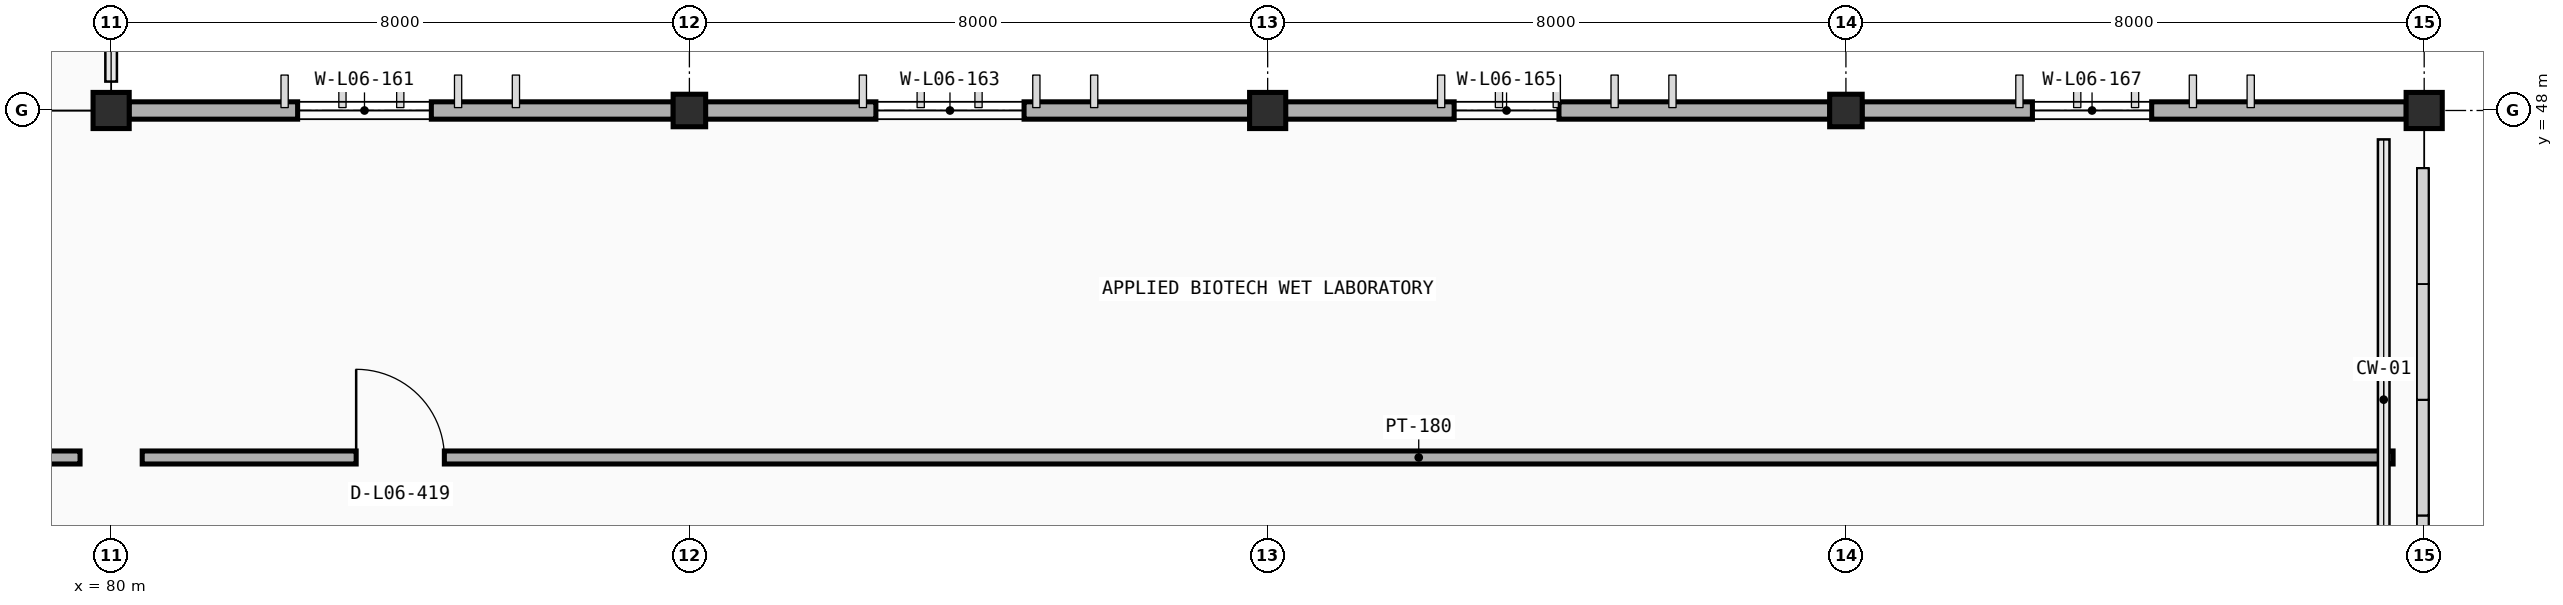
"""IFC4 building model, lengths in metres.
Left out: names, types, materials, properties, quantities, classifications, styles, units other than length and angle.
Written with IfcOpenShell. Run it as: python <this file> out.ifc"""

import sys

from ifc_helpers import new_model, si_unit, direction, frame, frame_2d, origin, origin_2d, place, context, subcontext, project, spatial, rectangle, extrude, element, fill, save


model = new_model("IFC4")
c1 = context("Model", 3, precision=1e-05, world=origin(), true_north=direction((0.0, 1.0)))
c2 = subcontext(c1, "Body", "Model", "MODEL_VIEW")
j1 = project(units=[si_unit("LENGTHUNIT", "METRE"), si_unit("PLANEANGLEUNIT", "RADIAN")], contexts=[c1])
p1 = place(None, origin())
s1 = spatial("IfcSite", under=j1, at=p1, CompositionType="ELEMENT")
p2 = place(p1, origin())
s2 = spatial("IfcBuilding", under=s1, at=p2, CompositionType="ELEMENT")
p3 = place(p2, frame((0.0, 0.0, 22.2)))
s3 = spatial("IfcBuildingStorey", under=s2, at=p3, CompositionType="ELEMENT", Elevation=22.2)
p4 = place(p3, frame((80.0, 48.0, 0.0), z_axis=(0.0, 0.0, 1.0), x_axis=(1.0, 0.0, 0.0)))
e1 = element("IfcColumn", 1, at=p4, inside=s3, PredefinedType="COLUMN", context=c2, shape_type="SweptSolid", body=[
    extrude(rectangle(XDim=0.5, YDim=0.5, at=origin_2d()), origin(), (0.0, 0.0, 1.0), 4.2),
])
p5 = place(p3, frame((88.0, 48.0, 0.0), z_axis=(0.0, 0.0, 1.0), x_axis=(1.0, 0.0, 0.0)))
e2 = element("IfcColumn", 2, at=p5, inside=s3, PredefinedType="COLUMN", context=c2, shape_type="SweptSolid", body=[
    extrude(rectangle(XDim=0.45, YDim=0.45, at=origin_2d()), origin(), (0.0, 0.0, 1.0), 4.2),
])
p6 = place(p3, frame((96.0, 48.0, 0.0), z_axis=(0.0, 0.0, 1.0), x_axis=(1.0, 0.0, 0.0)))
e3 = element("IfcColumn", 3, at=p6, inside=s3, PredefinedType="COLUMN", context=c2, shape_type="SweptSolid", body=[
    extrude(rectangle(XDim=0.5, YDim=0.5, at=origin_2d()), origin(), (0.0, 0.0, 1.0), 4.2),
])
p7 = place(p3, frame((104.0, 48.0, 0.0), z_axis=(0.0, 0.0, 1.0), x_axis=(1.0, 0.0, 0.0)))
e4 = element("IfcColumn", 4, at=p7, inside=s3, PredefinedType="COLUMN", context=c2, shape_type="SweptSolid", body=[
    extrude(rectangle(XDim=0.45, YDim=0.45, at=origin_2d()), origin(), (0.0, 0.0, 1.0), 4.2),
])
p8 = place(p3, frame((112.0, 48.0, 0.0), z_axis=(0.0, 0.0, 1.0), x_axis=(1.0, 0.0, 0.0)))
e5 = element("IfcColumn", 5, at=p8, inside=s3, PredefinedType="COLUMN", context=c2, shape_type="SweptSolid", body=[
    extrude(rectangle(XDim=0.5, YDim=0.5, at=origin_2d()), origin(), (0.0, 0.0, 1.0), 4.2),
])
p9 = place(p3, frame((80.247, 48.0, 0.0), z_axis=(0.0, 0.0, 1.0), x_axis=(1.0, 0.0, 0.0)))
e6 = element("IfcWall", 6, at=p9, inside=s3, PredefinedType="STANDARD", context=c2, shape_type="SweptSolid", body=[
    extrude(rectangle(XDim=7.531, YDim=0.24, at=frame_2d((3.766, 0.0))), origin(), (0.0, 0.0, 1.0), 3.335),
])
p10 = place(p9, frame((2.333, 0.0, 0.9)))
e7 = element("IfcOpeningElement", 7, at=p10, cuts=e6, PredefinedType="OPENING", context=c2, shape_type="SweptSolid", body=[
    extrude(rectangle(XDim=1.85, YDim=1.7, at=frame_2d((0.925, 0.85))), frame((0.0, 0.13, 0.0), z_axis=(0.0, -1.0, 0.0), x_axis=(1.0, 0.0, 0.0)), (0.0, 0.0, 1.0), 0.26),
])
p11 = place(p3, frame((88.222, 48.0, 0.0), z_axis=(0.0, 0.0, 1.0), x_axis=(1.0, 0.0, 0.0)))
e8 = element("IfcWall", 8, at=p11, inside=s3, PredefinedType="STANDARD", context=c2, shape_type="SweptSolid", body=[
    extrude(rectangle(XDim=7.531, YDim=0.24, at=frame_2d((3.766, 0.0))), origin(), (0.0, 0.0, 1.0), 3.335),
])
p12 = place(p11, frame((2.358, 0.0, 0.9)))
e9 = element("IfcOpeningElement", 9, at=p12, cuts=e8, PredefinedType="OPENING", context=c2, shape_type="SweptSolid", body=[
    extrude(rectangle(XDim=2.05, YDim=1.7, at=frame_2d((1.025, 0.85))), frame((0.0, 0.13, 0.0), z_axis=(0.0, -1.0, 0.0), x_axis=(1.0, 0.0, 0.0)), (0.0, 0.0, 1.0), 0.26),
])
p13 = place(p3, frame((96.247, 48.0, 0.0), z_axis=(0.0, 0.0, 1.0), x_axis=(1.0, 0.0, 0.0)))
e10 = element("IfcWall", 10, at=p13, inside=s3, PredefinedType="STANDARD", context=c2, shape_type="SweptSolid", body=[
    extrude(rectangle(XDim=7.531, YDim=0.24, at=frame_2d((3.766, 0.0))), origin(), (0.0, 0.0, 1.0), 3.335),
])
p14 = place(p13, frame((2.333, 0.0, 0.9)))
e11 = element("IfcOpeningElement", 11, at=p14, cuts=e10, PredefinedType="OPENING", context=c2, shape_type="SweptSolid", body=[
    extrude(rectangle(XDim=1.45, YDim=1.7, at=frame_2d((0.725, 0.85))), frame((0.0, 0.13, 0.0), z_axis=(0.0, -1.0, 0.0), x_axis=(1.0, 0.0, 0.0)), (0.0, 0.0, 1.0), 0.26),
])
p15 = place(p3, frame((104.222, 48.0, 0.0), z_axis=(0.0, 0.0, 1.0), x_axis=(1.0, 0.0, 0.0)))
e12 = element("IfcWall", 12, at=p15, inside=s3, PredefinedType="STANDARD", context=c2, shape_type="SweptSolid", body=[
    extrude(rectangle(XDim=7.531, YDim=0.24, at=frame_2d((3.766, 0.0))), origin(), (0.0, 0.0, 1.0), 3.335),
])
p16 = place(p15, frame((2.358, 0.0, 0.9)))
e13 = element("IfcOpeningElement", 13, at=p16, cuts=e12, PredefinedType="OPENING", context=c2, shape_type="SweptSolid", body=[
    extrude(rectangle(XDim=1.65, YDim=1.7, at=frame_2d((0.825, 0.85))), frame((0.0, 0.13, 0.0), z_axis=(0.0, -1.0, 0.0), x_axis=(1.0, 0.0, 0.0)), (0.0, 0.0, 1.0), 0.26),
])
p17 = place(p3, frame((111.76, 47.78, 0.0), z_axis=(0.0, 0.0, 1.0), x_axis=(-1.0, 0.0, 0.0)))
e14 = element("IfcWall", 14, at=p17, inside=s3, PredefinedType="PARAPET", context=c2, shape_type="SweptSolid", body=[
    extrude(rectangle(XDim=0.32, YDim=0.2, at=frame_2d((0.16, 0.0))), origin(), (0.0, 0.0, 1.0), 3.35),
])
p18 = place(p3, frame((64.43, 43.2, 0.0), z_axis=(0.0, 0.0, 1.0), x_axis=(1.0, 0.0, 0.0)))
e15 = element("IfcWall", 15, at=p18, inside=s3, PredefinedType="PARTITIONING", context=c2, shape_type="SweptSolid", body=[
    extrude(rectangle(XDim=15.14, YDim=0.18, at=frame_2d((7.57, 0.0))), origin(), (0.0, 0.0, 1.0), 3.3),
])
p19 = place(p18, frame((3.12, 0.0, 0.0)))
e16 = element("IfcOpeningElement", 16, at=p19, cuts=e15, PredefinedType="OPENING", context=c2, shape_type="SweptSolid", body=[
    extrude(rectangle(XDim=0.9, YDim=2.1, at=frame_2d((0.45, 1.05))), frame((0.0, 0.1, 0.0), z_axis=(0.0, -1.0, 0.0), x_axis=(1.0, 0.0, 0.0)), (0.0, 0.0, 1.0), 0.2),
])
p20 = place(p3, frame((80.43, 43.2, 0.0), z_axis=(0.0, 0.0, 1.0), x_axis=(1.0, 0.0, 0.0)))
e17 = element("IfcWall", 17, at=p20, inside=s3, PredefinedType="PARTITIONING", context=c2, shape_type="SweptSolid", body=[
    extrude(rectangle(XDim=31.14, YDim=0.18, at=frame_2d((15.57, 0.0))), origin(), (0.0, 0.0, 1.0), 3.3),
])
p21 = place(p20, frame((2.96, 0.0, 0.0)))
e18 = element("IfcOpeningElement", 18, at=p21, cuts=e17, PredefinedType="OPENING", context=c2, shape_type="SweptSolid", body=[
    extrude(rectangle(XDim=1.22, YDim=2.18, at=frame_2d((0.61, 1.09))), frame((0.0, 0.1, 0.0), z_axis=(0.0, -1.0, 0.0), x_axis=(1.0, 0.0, 0.0)), (0.0, 0.0, 1.0), 0.2),
])
p22 = place(p10, origin())
e19 = element("IfcWindow", 19, at=p22, inside=s3, PartitioningType="DOUBLE_PANEL_VERTICAL", PredefinedType="WINDOW", context=c2, shape_type="SweptSolid", body=[
    extrude(rectangle(XDim=1.85, YDim=1.7, at=frame_2d((0.925, 0.85))), frame((0.0, 0.03, 0.0), z_axis=(0.0, -1.0, 0.0), x_axis=(1.0, 0.0, 0.0)), (0.0, 0.0, 1.0), 0.06),
])
fill(e7, e19)
p23 = place(p12, origin())
e20 = element("IfcWindow", 20, at=p23, inside=s3, PartitioningType="DOUBLE_PANEL_VERTICAL", PredefinedType="WINDOW", context=c2, shape_type="SweptSolid", body=[
    extrude(rectangle(XDim=2.05, YDim=1.7, at=frame_2d((1.025, 0.85))), frame((0.0, 0.03, 0.0), z_axis=(0.0, -1.0, 0.0), x_axis=(1.0, 0.0, 0.0)), (0.0, 0.0, 1.0), 0.06),
])
fill(e9, e20)
p24 = place(p14, origin())
e21 = element("IfcWindow", 21, at=p24, inside=s3, PartitioningType="SINGLE_PANEL", PredefinedType="WINDOW", context=c2, shape_type="SweptSolid", body=[
    extrude(rectangle(XDim=1.45, YDim=1.7, at=frame_2d((0.725, 0.85))), frame((0.0, 0.03, 0.0), z_axis=(0.0, -1.0, 0.0), x_axis=(1.0, 0.0, 0.0)), (0.0, 0.0, 1.0), 0.06),
])
fill(e11, e21)
p25 = place(p16, origin())
e22 = element("IfcWindow", 22, at=p25, inside=s3, PartitioningType="DOUBLE_PANEL_VERTICAL", PredefinedType="WINDOW", context=c2, shape_type="SweptSolid", body=[
    extrude(rectangle(XDim=1.65, YDim=1.7, at=frame_2d((0.825, 0.85))), frame((0.0, 0.03, 0.0), z_axis=(0.0, -1.0, 0.0), x_axis=(1.0, 0.0, 0.0)), (0.0, 0.0, 1.0), 0.06),
])
fill(e13, e22)
p26 = place(p21, origin())
e23 = element("IfcDoor", 23, at=p26, inside=s3, OperationType="SINGLE_SWING_LEFT", PredefinedType="DOOR", context=c2, shape_type="SweptSolid", body=[
    extrude(rectangle(XDim=1.22, YDim=2.18, at=frame_2d((0.61, 1.09))), frame((0.0, 0.025, 0.0), z_axis=(0.0, -1.0, 0.0), x_axis=(1.0, 0.0, 0.0)), (0.0, 0.0, 1.0), 0.05),
])
fill(e18, e23)
save(model, sys.argv[1])
